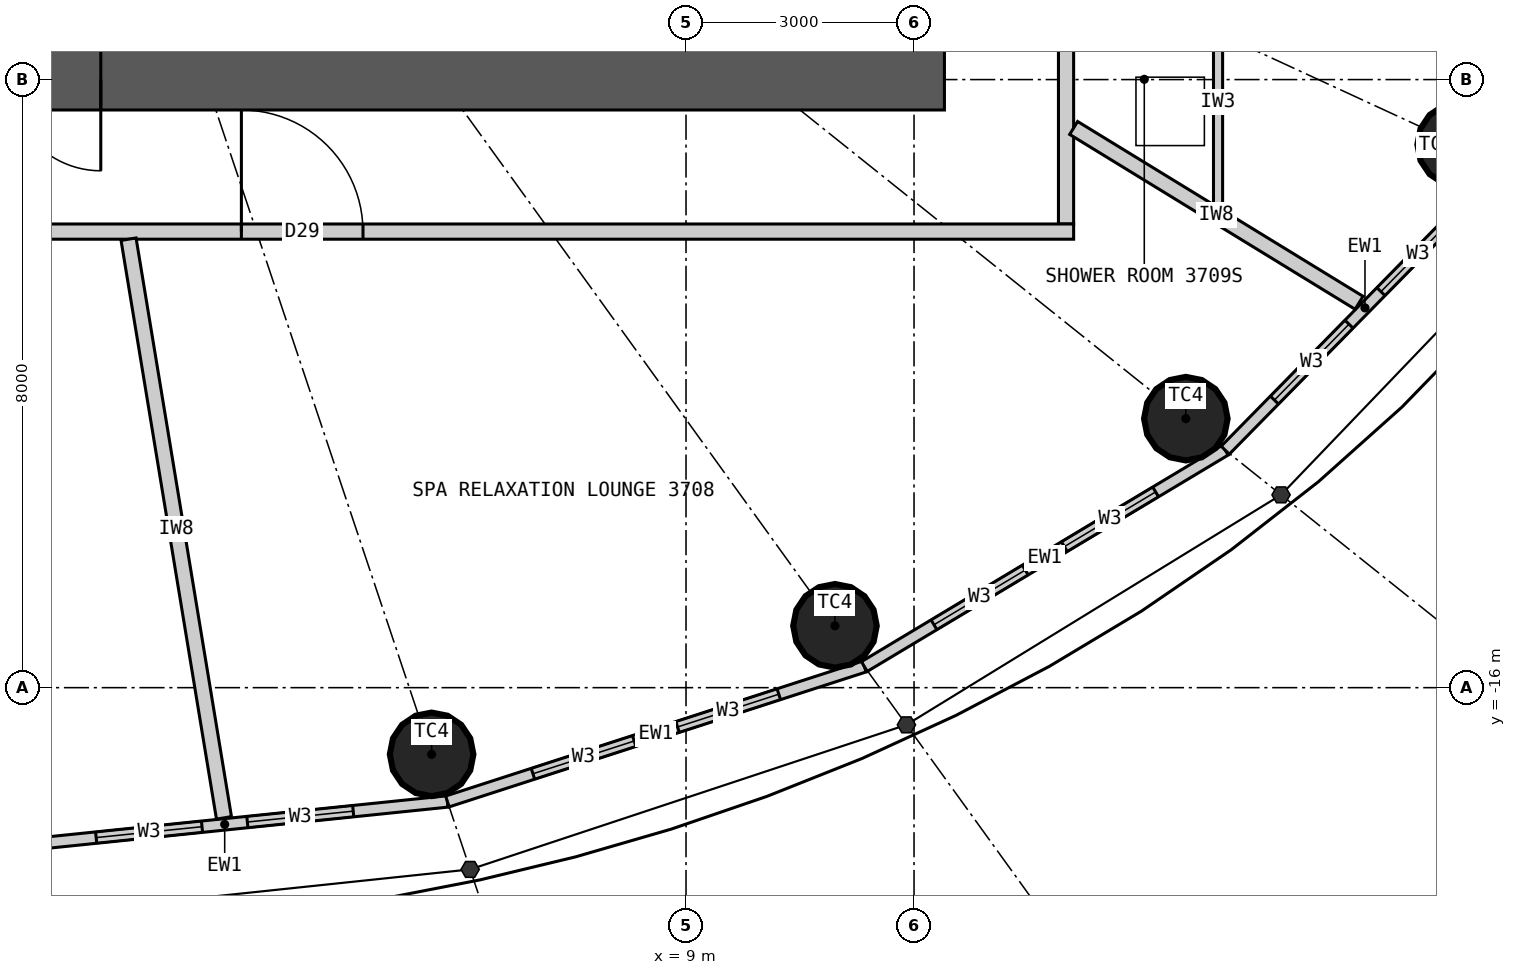
"""IFC4 building model, lengths in metres.
Left out: names, types, materials, properties, quantities, classifications, styles, units other than length and angle.
Written with IfcOpenShell. Run it as: python <this file> out.ifc"""

import sys

from ifc_helpers import new_model, si_unit, direction, frame, frame_2d, origin, origin_2d, place, context, subcontext, project, spatial, rectangle, circle, extrude, element, fill, save


model = new_model("IFC4")
c1 = context("Model", 3, precision=1e-05, world=origin(), true_north=direction((0.0, 1.0)))
c2 = subcontext(c1, "Body", "Model", "MODEL_VIEW")
j1 = project(units=[si_unit("LENGTHUNIT", "METRE"), si_unit("PLANEANGLEUNIT", "RADIAN")], contexts=[c1])
p1 = place(None, origin())
s1 = spatial("IfcSite", under=j1, at=p1, CompositionType="ELEMENT")
p2 = place(p1, origin())
s2 = spatial("IfcBuilding", under=s1, at=p2, CompositionType="ELEMENT")
p3 = place(p2, frame((0.0, 0.0, 143.4)))
s3 = spatial("IfcBuildingStorey", under=s2, at=p3, CompositionType="ELEMENT", Elevation=143.4)
for number, where, z_axis, x_axis in (
    (1, (5.653, -16.877, 0.0), (0.0, 0.0, 1.0), (1.0, 0.0, 0.0)),
    (2, (10.96, -15.186, 0.0), (0.0, 0.0, 1.0), (1.0, 0.0, 0.0)),
    (3, (15.576, -12.461, 0.0), (0.0, 0.0, 1.0), (1.0, 0.0, 0.0)),
    (4, (19.172, -8.855, 0.0), (0.0, 0.0, 1.0), (1.0, 0.0, 0.0)),
):
    element("IfcColumn", number, at=place(p3, frame(where, z_axis=z_axis, x_axis=x_axis)), inside=s3, PredefinedType="COLUMN", context=c2, shape_type="SweptSolid", body=[
        extrude(circle(Radius=0.55, at=origin_2d()), origin(), (0.0, 0.0, 1.0), 3.3),
    ])
p4 = place(p3, frame((12.4, -8.0, 0.0), z_axis=(0.0, 0.0, 1.0), x_axis=(-1.0, 0.0, 0.0)))
e5 = element("IfcWall", 5, at=p4, inside=s3, PredefinedType="SHEAR", context=c2, shape_type="SweptSolid", body=[
    extrude(rectangle(XDim=24.8, YDim=0.8, at=frame_2d((12.4, 0.0))), origin(), (0.0, 0.0, 1.0), 3.3),
])
p5 = place(p4, frame((11.1, 0.0, 0.0)))
e6 = element("IfcOpeningElement", 6, at=p5, cuts=e5, PredefinedType="OPENING", context=c2, shape_type="SweptSolid", body=[
    extrude(rectangle(XDim=1.2, YDim=2.2, at=frame_2d((0.6, 1.1))), frame((0.0, 0.41, 0.0), z_axis=(0.0, -1.0, 0.0), x_axis=(1.0, 0.0, 0.0)), (0.0, 0.0, 1.0), 0.82),
])
p6 = place(p4, frame((18.7, 0.0, 0.0)))
e7 = element("IfcOpeningElement", 7, at=p6, cuts=e5, PredefinedType="OPENING", context=c2, shape_type="SweptSolid", body=[
    extrude(rectangle(XDim=0.9, YDim=2.2, at=frame_2d((0.45, 1.1))), frame((0.0, 0.41, 0.0), z_axis=(0.0, -1.0, 0.0), x_axis=(1.0, 0.0, 0.0)), (0.0, 0.0, 1.0), 0.82),
])
p7 = place(p3, frame((0.0, -18.1, 0.0), z_axis=(0.0, 0.0, 1.0), x_axis=(0.994751738032, 0.102318032045, 0.0)))
e8 = element("IfcWall", 8, at=p7, inside=s3, PredefinedType="ELEMENTEDWALL", context=c2, shape_type="SweptSolid", body=[
    extrude(rectangle(XDim=5.891, YDim=0.15, at=frame_2d((2.946, 0.0))), origin(), (0.0, 0.0, 1.0), 3.12),
])
p8 = place(p7, frame((1.246, 0.0, 0.9)))
e9 = element("IfcOpeningElement", 9, at=p8, cuts=e8, PredefinedType="OPENING", context=c2, shape_type="SweptSolid", body=[
    extrude(rectangle(XDim=1.4, YDim=1.9, at=frame_2d((0.7, 0.95))), frame((0.0, 0.085, 0.0), z_axis=(0.0, -1.0, 0.0), x_axis=(1.0, 0.0, 0.0)), (0.0, 0.0, 1.0), 0.17),
])
p9 = place(p7, frame((3.246, 0.0, 0.9)))
e10 = element("IfcOpeningElement", 10, at=p9, cuts=e8, PredefinedType="OPENING", context=c2, shape_type="SweptSolid", body=[
    extrude(rectangle(XDim=1.4, YDim=1.9, at=frame_2d((0.7, 0.95))), frame((0.0, 0.085, 0.0), z_axis=(0.0, -1.0, 0.0), x_axis=(1.0, 0.0, 0.0)), (0.0, 0.0, 1.0), 0.17),
])
p10 = place(p3, frame((5.86, -17.497, 0.0), z_axis=(0.0, 0.0, 1.0), x_axis=(0.951432482129, 0.307857486429, 0.0)))
e11 = element("IfcWall", 11, at=p10, inside=s3, PredefinedType="ELEMENTEDWALL", context=c2, shape_type="SweptSolid", body=[
    extrude(rectangle(XDim=5.766, YDim=0.15, at=frame_2d((2.883, 0.0))), origin(), (0.0, 0.0, 1.0), 3.12),
])
p11 = place(p10, frame((1.183, 0.0, 0.9)))
e12 = element("IfcOpeningElement", 12, at=p11, cuts=e11, PredefinedType="OPENING", context=c2, shape_type="SweptSolid", body=[
    extrude(rectangle(XDim=1.4, YDim=1.9, at=frame_2d((0.7, 0.95))), frame((0.0, 0.085, 0.0), z_axis=(0.0, -1.0, 0.0), x_axis=(1.0, 0.0, 0.0)), (0.0, 0.0, 1.0), 0.17),
])
p12 = place(p10, frame((3.183, 0.0, 0.9)))
e13 = element("IfcOpeningElement", 13, at=p12, cuts=e11, PredefinedType="OPENING", context=c2, shape_type="SweptSolid", body=[
    extrude(rectangle(XDim=1.4, YDim=1.9, at=frame_2d((0.7, 0.95))), frame((0.0, 0.085, 0.0), z_axis=(0.0, -1.0, 0.0), x_axis=(1.0, 0.0, 0.0)), (0.0, 0.0, 1.0), 0.17),
])
p13 = place(p3, frame((11.346, -15.722, 0.0), z_axis=(0.0, 0.0, 1.0), x_axis=(0.857695199231, 0.514158482587, 0.0)))
e14 = element("IfcWall", 14, at=p13, inside=s3, PredefinedType="ELEMENTEDWALL", context=c2, shape_type="SweptSolid", body=[
    extrude(rectangle(XDim=5.536, YDim=0.15, at=frame_2d((2.768, 0.0))), origin(), (0.0, 0.0, 1.0), 3.12),
])
p14 = place(p13, frame((1.068, 0.0, 0.9)))
e15 = element("IfcOpeningElement", 15, at=p14, cuts=e14, PredefinedType="OPENING", context=c2, shape_type="SweptSolid", body=[
    extrude(rectangle(XDim=1.4, YDim=1.9, at=frame_2d((0.7, 0.95))), frame((0.0, 0.085, 0.0), z_axis=(0.0, -1.0, 0.0), x_axis=(1.0, 0.0, 0.0)), (0.0, 0.0, 1.0), 0.17),
])
p15 = place(p13, frame((3.068, 0.0, 0.9)))
e16 = element("IfcOpeningElement", 16, at=p15, cuts=e14, PredefinedType="OPENING", context=c2, shape_type="SweptSolid", body=[
    extrude(rectangle(XDim=1.4, YDim=1.9, at=frame_2d((0.7, 0.95))), frame((0.0, 0.085, 0.0), z_axis=(0.0, -1.0, 0.0), x_axis=(1.0, 0.0, 0.0)), (0.0, 0.0, 1.0), 0.17),
])
p16 = place(p3, frame((16.095, -12.876, 0.0), z_axis=(0.0, 0.0, 1.0), x_axis=(0.700727467776, 0.71342905457, 0.0)))
e17 = element("IfcWall", 17, at=p16, inside=s3, PredefinedType="ELEMENTEDWALL", context=c2, shape_type="SweptSolid", body=[
    extrude(rectangle(XDim=5.247, YDim=0.15, at=frame_2d((2.624, 0.0))), origin(), (0.0, 0.0, 1.0), 3.12),
])
p17 = place(p16, frame((0.924, 0.0, 0.9)))
e18 = element("IfcOpeningElement", 18, at=p17, cuts=e17, PredefinedType="OPENING", context=c2, shape_type="SweptSolid", body=[
    extrude(rectangle(XDim=1.4, YDim=1.9, at=frame_2d((0.7, 0.95))), frame((0.0, 0.085, 0.0), z_axis=(0.0, -1.0, 0.0), x_axis=(1.0, 0.0, 0.0)), (0.0, 0.0, 1.0), 0.17),
])
p18 = place(p16, frame((2.924, 0.0, 0.9)))
e19 = element("IfcOpeningElement", 19, at=p18, cuts=e17, PredefinedType="OPENING", context=c2, shape_type="SweptSolid", body=[
    extrude(rectangle(XDim=1.4, YDim=1.9, at=frame_2d((0.7, 0.95))), frame((0.0, 0.085, 0.0), z_axis=(0.0, -1.0, 0.0), x_axis=(1.0, 0.0, 0.0)), (0.0, 0.0, 1.0), 0.17),
])
p19 = place(p3, frame((14.0, -9.9, 0.0), z_axis=(0.0, 0.0, 1.0), x_axis=(0.0, 1.0, 0.0)))
e20 = element("IfcWall", 20, at=p19, inside=s3, PredefinedType="PARTITIONING", context=c2, shape_type="SweptSolid", body=[
    extrude(rectangle(XDim=19.8, YDim=0.2, at=frame_2d((9.9, 0.0))), origin(), (0.0, 0.0, 1.0), 3.12),
])
p20 = place(p19, frame((3.124, 0.0, 0.0)))
e21 = element("IfcOpeningElement", 21, at=p20, cuts=e20, PredefinedType="OPENING", context=c2, shape_type="SweptSolid", body=[
    extrude(rectangle(XDim=1.0, YDim=2.2, at=frame_2d((0.5, 1.1))), frame((0.0, 0.11, 0.0), z_axis=(0.0, -1.0, 0.0), x_axis=(1.0, 0.0, 0.0)), (0.0, 0.0, 1.0), 0.22),
])
p21 = place(p19, frame((6.574, 0.0, 0.0)))
e22 = element("IfcOpeningElement", 22, at=p21, cuts=e20, PredefinedType="OPENING", context=c2, shape_type="SweptSolid", body=[
    extrude(rectangle(XDim=1.6, YDim=2.4, at=frame_2d((0.8, 1.2))), frame((0.0, 0.11, 0.0), z_axis=(0.0, -1.0, 0.0), x_axis=(1.0, 0.0, 0.0)), (0.0, 0.0, 1.0), 0.22),
])
p22 = place(p19, frame((17.701, 0.0, 0.0)))
e23 = element("IfcOpeningElement", 23, at=p22, cuts=e20, PredefinedType="OPENING", context=c2, shape_type="SweptSolid", body=[
    extrude(rectangle(XDim=1.0, YDim=2.2, at=frame_2d((0.5, 1.1))), frame((0.0, 0.11, 0.0), z_axis=(0.0, -1.0, 0.0), x_axis=(1.0, 0.0, 0.0)), (0.0, 0.0, 1.0), 0.22),
])
p23 = place(p3, frame((14.1, -10.0, 0.0), z_axis=(0.0, 0.0, 1.0), x_axis=(-1.0, 0.0, 0.0)))
e24 = element("IfcWall", 24, at=p23, inside=s3, PredefinedType="PARTITIONING", context=c2, shape_type="SweptSolid", body=[
    extrude(rectangle(XDim=28.2, YDim=0.2, at=frame_2d((14.1, 0.0))), origin(), (0.0, 0.0, 1.0), 3.12),
])
p24 = place(p23, frame((23.045, 0.0, 0.0)))
e25 = element("IfcOpeningElement", 25, at=p24, cuts=e24, PredefinedType="OPENING", context=c2, shape_type="SweptSolid", body=[
    extrude(rectangle(XDim=1.0, YDim=2.2, at=frame_2d((0.5, 1.1))), frame((0.0, 0.11, 0.0), z_axis=(0.0, -1.0, 0.0), x_axis=(1.0, 0.0, 0.0)), (0.0, 0.0, 1.0), 0.22),
])
p25 = place(p23, frame((18.529, 0.0, 0.0)))
e26 = element("IfcOpeningElement", 26, at=p25, cuts=e24, PredefinedType="OPENING", context=c2, shape_type="SweptSolid", body=[
    extrude(rectangle(XDim=1.0, YDim=2.2, at=frame_2d((0.5, 1.1))), frame((0.0, 0.11, 0.0), z_axis=(0.0, -1.0, 0.0), x_axis=(1.0, 0.0, 0.0)), (0.0, 0.0, 1.0), 0.22),
])
p26 = place(p23, frame((13.923, 0.0, 0.0)))
e27 = element("IfcOpeningElement", 27, at=p26, cuts=e24, PredefinedType="OPENING", context=c2, shape_type="SweptSolid", body=[
    extrude(rectangle(XDim=1.0, YDim=2.2, at=frame_2d((0.5, 1.1))), frame((0.0, 0.11, 0.0), z_axis=(0.0, -1.0, 0.0), x_axis=(1.0, 0.0, 0.0)), (0.0, 0.0, 1.0), 0.22),
])
p27 = place(p23, frame((9.35, 0.0, 0.0)))
e28 = element("IfcOpeningElement", 28, at=p27, cuts=e24, PredefinedType="OPENING", context=c2, shape_type="SweptSolid", body=[
    extrude(rectangle(XDim=1.6, YDim=2.4, at=frame_2d((0.8, 1.2))), frame((0.0, 0.11, 0.0), z_axis=(0.0, -1.0, 0.0), x_axis=(1.0, 0.0, 0.0)), (0.0, 0.0, 1.0), 0.22),
])
p28 = place(p3, frame((1.666, -10.1, 0.0), z_axis=(0.0, 0.0, 1.0), x_axis=(0.162669562982, -0.986680603478, 0.0)))
e29 = element("IfcWall", 29, at=p28, inside=s3, PredefinedType="PARTITIONING", context=c2, shape_type="SweptSolid", body=[
    extrude(rectangle(XDim=7.716, YDim=0.2, at=frame_2d((3.858, 0.0))), origin(), (0.0, 0.0, 1.0), 3.12),
])
p29 = place(p3, frame((14.1, -8.636, 0.0), z_axis=(0.0, 0.0, 1.0), x_axis=(0.852731884196, -0.522348862041, 0.0)))
e30 = element("IfcWall", 30, at=p29, inside=s3, PredefinedType="PARTITIONING", context=c2, shape_type="SweptSolid", body=[
    extrude(rectangle(XDim=4.404, YDim=0.2, at=frame_2d((2.202, 0.0))), origin(), (0.0, 0.0, 1.0), 3.12),
])
p30 = place(p3, frame((16.0, -9.7, 0.0), z_axis=(0.0, 0.0, 1.0), x_axis=(0.0, 1.0, 0.0)))
e31 = element("IfcWall", 31, at=p30, inside=s3, PredefinedType="PARTITIONING", context=c2, shape_type="SweptSolid", body=[
    extrude(rectangle(XDim=2.804, YDim=0.12, at=frame_2d((1.402, 0.0))), origin(), (0.0, 0.0, 1.0), 3.12),
])
p31 = place(p8, origin())
e32 = element("IfcWindow", 32, at=p31, inside=s3, PartitioningType="SINGLE_PANEL", PredefinedType="WINDOW", context=c2, shape_type="SweptSolid", body=[
    extrude(rectangle(XDim=1.4, YDim=1.9, at=frame_2d((0.7, 0.95))), frame((0.0, 0.03, 0.0), z_axis=(0.0, -1.0, 0.0), x_axis=(1.0, 0.0, 0.0)), (0.0, 0.0, 1.0), 0.06),
])
fill(e9, e32)
p32 = place(p9, origin())
e33 = element("IfcWindow", 33, at=p32, inside=s3, PartitioningType="SINGLE_PANEL", PredefinedType="WINDOW", context=c2, shape_type="SweptSolid", body=[
    extrude(rectangle(XDim=1.4, YDim=1.9, at=frame_2d((0.7, 0.95))), frame((0.0, 0.03, 0.0), z_axis=(0.0, -1.0, 0.0), x_axis=(1.0, 0.0, 0.0)), (0.0, 0.0, 1.0), 0.06),
])
fill(e10, e33)
p33 = place(p11, origin())
e34 = element("IfcWindow", 34, at=p33, inside=s3, PartitioningType="SINGLE_PANEL", PredefinedType="WINDOW", context=c2, shape_type="SweptSolid", body=[
    extrude(rectangle(XDim=1.4, YDim=1.9, at=frame_2d((0.7, 0.95))), frame((0.0, 0.03, 0.0), z_axis=(0.0, -1.0, 0.0), x_axis=(1.0, 0.0, 0.0)), (0.0, 0.0, 1.0), 0.06),
])
fill(e12, e34)
p34 = place(p12, origin())
e35 = element("IfcWindow", 35, at=p34, inside=s3, PartitioningType="SINGLE_PANEL", PredefinedType="WINDOW", context=c2, shape_type="SweptSolid", body=[
    extrude(rectangle(XDim=1.4, YDim=1.9, at=frame_2d((0.7, 0.95))), frame((0.0, 0.03, 0.0), z_axis=(0.0, -1.0, 0.0), x_axis=(1.0, 0.0, 0.0)), (0.0, 0.0, 1.0), 0.06),
])
fill(e13, e35)
p35 = place(p14, origin())
e36 = element("IfcWindow", 36, at=p35, inside=s3, PartitioningType="SINGLE_PANEL", PredefinedType="WINDOW", context=c2, shape_type="SweptSolid", body=[
    extrude(rectangle(XDim=1.4, YDim=1.9, at=frame_2d((0.7, 0.95))), frame((0.0, 0.03, 0.0), z_axis=(0.0, -1.0, 0.0), x_axis=(1.0, 0.0, 0.0)), (0.0, 0.0, 1.0), 0.06),
])
fill(e15, e36)
p36 = place(p15, origin())
e37 = element("IfcWindow", 37, at=p36, inside=s3, PartitioningType="SINGLE_PANEL", PredefinedType="WINDOW", context=c2, shape_type="SweptSolid", body=[
    extrude(rectangle(XDim=1.4, YDim=1.9, at=frame_2d((0.7, 0.95))), frame((0.0, 0.03, 0.0), z_axis=(0.0, -1.0, 0.0), x_axis=(1.0, 0.0, 0.0)), (0.0, 0.0, 1.0), 0.06),
])
fill(e16, e37)
p37 = place(p17, origin())
e38 = element("IfcWindow", 38, at=p37, inside=s3, PartitioningType="SINGLE_PANEL", PredefinedType="WINDOW", context=c2, shape_type="SweptSolid", body=[
    extrude(rectangle(XDim=1.4, YDim=1.9, at=frame_2d((0.7, 0.95))), frame((0.0, 0.03, 0.0), z_axis=(0.0, -1.0, 0.0), x_axis=(1.0, 0.0, 0.0)), (0.0, 0.0, 1.0), 0.06),
])
fill(e18, e38)
p38 = place(p18, origin())
e39 = element("IfcWindow", 39, at=p38, inside=s3, PartitioningType="SINGLE_PANEL", PredefinedType="WINDOW", context=c2, shape_type="SweptSolid", body=[
    extrude(rectangle(XDim=1.4, YDim=1.9, at=frame_2d((0.7, 0.95))), frame((0.0, 0.03, 0.0), z_axis=(0.0, -1.0, 0.0), x_axis=(1.0, 0.0, 0.0)), (0.0, 0.0, 1.0), 0.06),
])
fill(e19, e39)
p39 = place(p27, origin())
e40 = element("IfcDoor", 40, at=p39, inside=s3, OperationType="DOUBLE_DOOR_DOUBLE_SWING", PredefinedType="DOOR", context=c2, shape_type="SweptSolid", body=[
    extrude(rectangle(XDim=1.6, YDim=2.4, at=frame_2d((0.8, 1.2))), frame((0.0, 0.025, 0.0), z_axis=(0.0, -1.0, 0.0), x_axis=(1.0, 0.0, 0.0)), (0.0, 0.0, 1.0), 0.05),
])
fill(e28, e40)
p40 = place(p5, origin())
e41 = element("IfcDoor", 41, at=p40, inside=s3, OperationType="SINGLE_SWING_LEFT", PredefinedType="DOOR", context=c2, shape_type="SweptSolid", body=[
    extrude(rectangle(XDim=1.2, YDim=2.2, at=frame_2d((0.6, 1.1))), frame((0.0, 0.025, 0.0), z_axis=(0.0, -1.0, 0.0), x_axis=(1.0, 0.0, 0.0)), (0.0, 0.0, 1.0), 0.05),
])
fill(e6, e41)
save(model, sys.argv[1])
